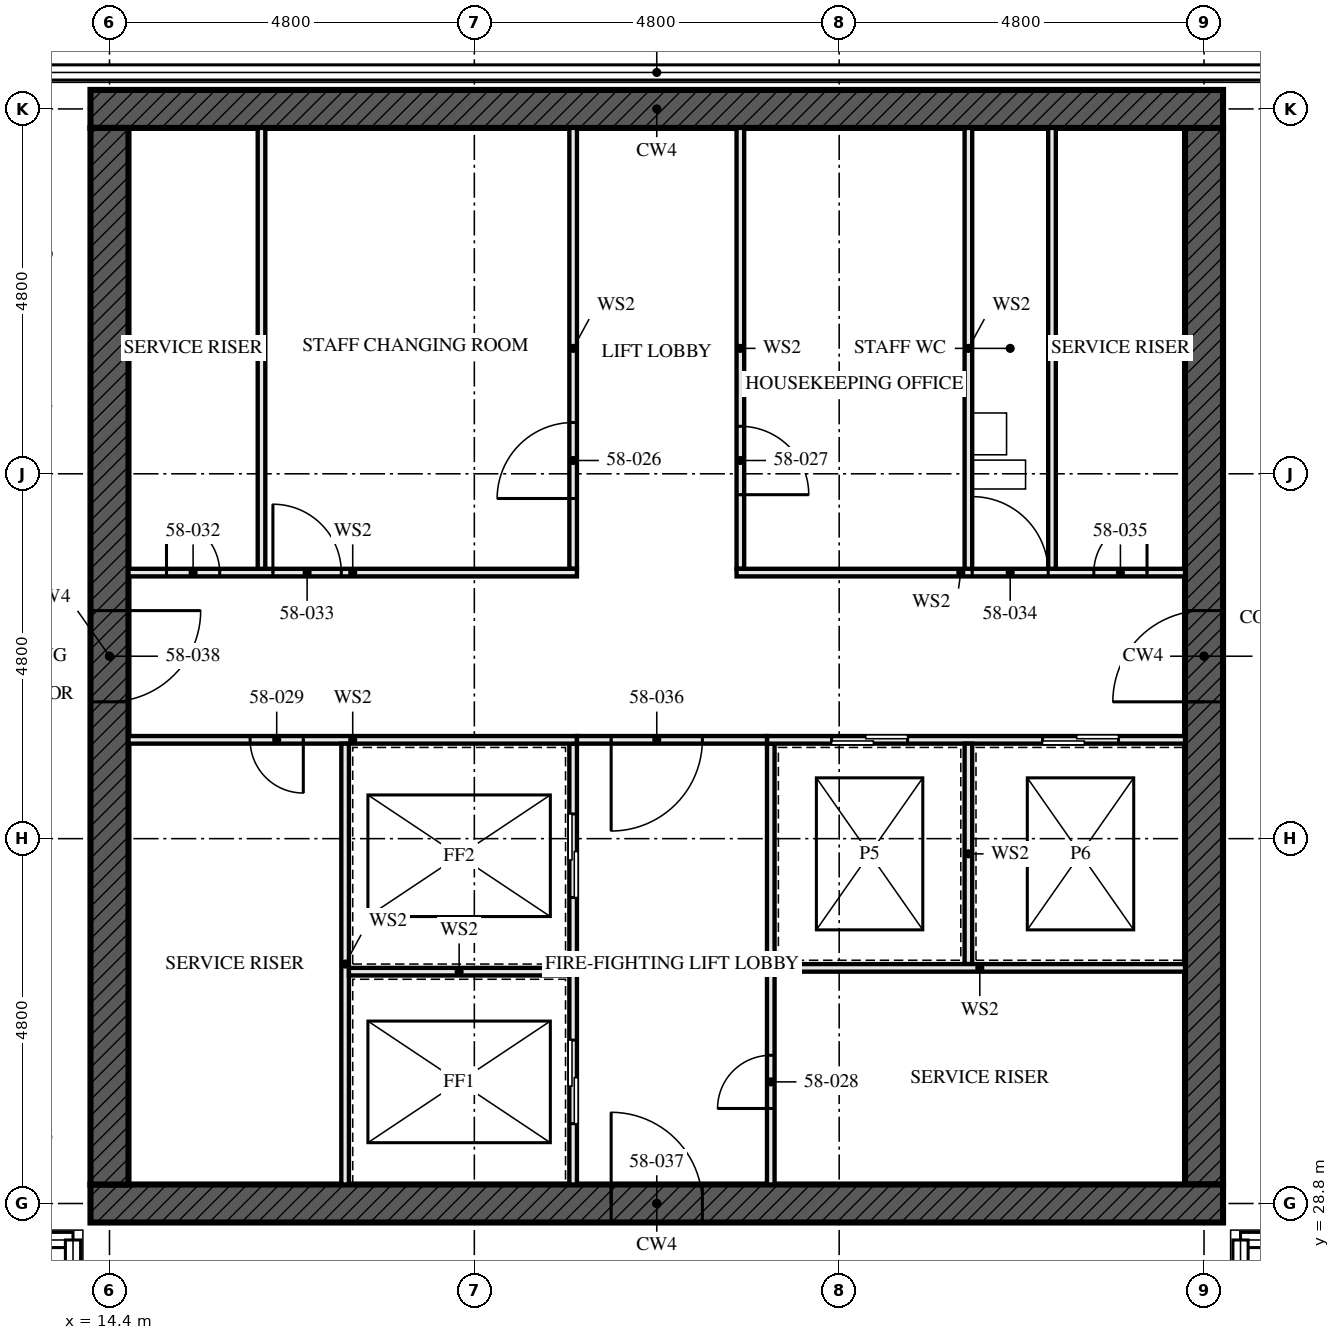
"""IFC4 building model, lengths in metres.
Left out: names, types, materials, properties, quantities, classifications, styles, units other than length and angle.
Written with IfcOpenShell. Run it as: python <this file> out.ifc"""

import sys

from ifc_helpers import new_model, si_unit, direction, frame, frame_2d, origin, place, context, subcontext, project, spatial, rectangle, extrude, element, fill, save


model = new_model("IFC4")
c1 = context("Model", 3, precision=1e-05, world=origin(), true_north=direction((0.0, 1.0)))
c2 = subcontext(c1, "Body", "Model", "MODEL_VIEW")
j1 = project(units=[si_unit("LENGTHUNIT", "METRE"), si_unit("PLANEANGLEUNIT", "RADIAN")], contexts=[c1])
p1 = place(None, origin())
s1 = spatial("IfcSite", under=j1, at=p1, CompositionType="ELEMENT")
p2 = place(p1, origin())
s2 = spatial("IfcBuilding", under=s1, at=p2, CompositionType="ELEMENT")
p3 = place(p2, frame((0.0, 0.0, 212.0)))
s3 = spatial("IfcBuildingStorey", under=s2, at=p3, CompositionType="ELEMENT", Elevation=212.0)
p4 = place(p3, frame((14.15, 28.8, -0.17), z_axis=(0.0, 0.0, 1.0), x_axis=(1.0, 0.0, 0.0)))
e1 = element("IfcWall", 1, at=p4, inside=s3, PredefinedType="SHEAR", context=c2, shape_type="SweptSolid", body=[
    extrude(rectangle(XDim=14.9, YDim=0.5, at=frame_2d((7.45, 0.0))), origin(), (0.0, 0.0, 1.0), 3.5),
])
p5 = place(p4, frame((6.85, 0.0, 0.17)))
e2 = element("IfcOpeningElement", 2, at=p5, cuts=e1, PredefinedType="OPENING", context=c2, shape_type="SweptSolid", body=[
    extrude(rectangle(XDim=1.2, YDim=2.1, at=frame_2d((0.6, 1.05))), frame((0.0, 0.26, 0.0), z_axis=(0.0, -1.0, 0.0), x_axis=(1.0, 0.0, 0.0)), (0.0, 0.0, 1.0), 0.521),
])
p6 = place(p3, frame((29.05, 43.2, -0.17), z_axis=(0.0, 0.0, 1.0), x_axis=(-1.0, 0.0, 0.0)))
e3 = element("IfcWall", 3, at=p6, inside=s3, PredefinedType="SHEAR", context=c2, shape_type="SweptSolid", body=[
    extrude(rectangle(XDim=14.9, YDim=0.5, at=frame_2d((7.45, 0.0))), origin(), (0.0, 0.0, 1.0), 3.5),
])
p7 = place(p3, frame((14.4, 42.95, -0.17), z_axis=(0.0, 0.0, 1.0), x_axis=(0.0, -1.0, 0.0)))
e4 = element("IfcWall", 4, at=p7, inside=s3, PredefinedType="SHEAR", context=c2, shape_type="SweptSolid", body=[
    extrude(rectangle(XDim=13.9, YDim=0.5, at=frame_2d((6.95, 0.0))), origin(), (0.0, 0.0, 1.0), 3.5),
])
p8 = place(p7, frame((6.35, 0.0, 0.17)))
e5 = element("IfcOpeningElement", 5, at=p8, cuts=e4, PredefinedType="OPENING", context=c2, shape_type="SweptSolid", body=[
    extrude(rectangle(XDim=1.2, YDim=2.1, at=frame_2d((0.6, 1.05))), frame((0.0, 0.26, 0.0), z_axis=(0.0, -1.0, 0.0), x_axis=(1.0, 0.0, 0.0)), (0.0, 0.0, 1.0), 0.521),
])
p9 = place(p3, frame((28.8, 29.05, -0.17), z_axis=(0.0, 0.0, 1.0), x_axis=(0.0, 1.0, 0.0)))
e6 = element("IfcWall", 6, at=p9, inside=s3, PredefinedType="SHEAR", context=c2, shape_type="SweptSolid", body=[
    extrude(rectangle(XDim=13.9, YDim=0.5, at=frame_2d((6.95, 0.0))), origin(), (0.0, 0.0, 1.0), 3.5),
])
p10 = place(p9, frame((6.35, 0.0, 0.17)))
e7 = element("IfcOpeningElement", 7, at=p10, cuts=e6, PredefinedType="OPENING", context=c2, shape_type="SweptSolid", body=[
    extrude(rectangle(XDim=1.2, YDim=2.1, at=frame_2d((0.6, 1.05))), frame((0.0, 0.26, 0.0), z_axis=(0.0, -1.0, 0.0), x_axis=(1.0, 0.0, 0.0)), (0.0, 0.0, 1.0), 0.521),
])
for number, where, z_axis, x_axis in (
    (8, (16.4, 37.15, 0.0), (0.0, 0.0, 1.0), (0.0, 1.0, 0.0)),
    (9, (26.8, 37.15, 0.0), (0.0, 0.0, 1.0), (0.0, 1.0, 0.0)),
):
    element("IfcWall", number, at=place(p3, frame(where, z_axis=z_axis, x_axis=x_axis)), inside=s3, PredefinedType="SOLIDWALL", context=c2, shape_type="SweptSolid", body=[
        extrude(rectangle(XDim=5.8, YDim=0.1, at=frame_2d((2.9, 0.0))), origin(), (0.0, 0.0, 1.0), 3.33),
    ])
p11 = place(p3, frame((20.5, 29.05, 0.0), z_axis=(0.0, 0.0, 1.0), x_axis=(0.0, 1.0, 0.0)))
e10 = element("IfcWall", 10, at=p11, inside=s3, PredefinedType="SOLIDWALL", context=c2, shape_type="SweptSolid", body=[
    extrude(rectangle(XDim=5.8, YDim=0.1, at=frame_2d((2.9, 0.0))), origin(), (0.0, 0.0, 1.0), 3.33),
])
p12 = place(p11, frame((0.8, 0.0, 0.0)))
e11 = element("IfcOpeningElement", 11, at=p12, cuts=e10, PredefinedType="OPENING", context=c2, shape_type="SweptSolid", body=[
    extrude(rectangle(XDim=1.1, YDim=2.3, at=frame_2d((0.55, 1.15))), frame((0.0, 0.061, 0.0), z_axis=(0.0, -1.0, 0.0), x_axis=(1.0, 0.0, 0.0)), (0.0, 0.0, 1.0), 0.121),
])
p13 = place(p11, frame((3.775, 0.0, 0.0)))
e12 = element("IfcOpeningElement", 12, at=p13, cuts=e10, PredefinedType="OPENING", context=c2, shape_type="SweptSolid", body=[
    extrude(rectangle(XDim=1.1, YDim=2.3, at=frame_2d((0.55, 1.15))), frame((0.0, 0.061, 0.0), z_axis=(0.0, -1.0, 0.0), x_axis=(1.0, 0.0, 0.0)), (0.0, 0.0, 1.0), 0.121),
])
p14 = place(p3, frame((20.5, 37.15, 0.0), z_axis=(0.0, 0.0, 1.0), x_axis=(0.0, 1.0, 0.0)))
e13 = element("IfcWall", 13, at=p14, inside=s3, PredefinedType="SOLIDWALL", context=c2, shape_type="SweptSolid", body=[
    extrude(rectangle(XDim=5.8, YDim=0.1, at=frame_2d((2.9, 0.0))), origin(), (0.0, 0.0, 1.0), 3.33),
])
p15 = place(p14, frame((0.925, 0.0, 0.0)))
e14 = element("IfcOpeningElement", 14, at=p15, cuts=e13, PredefinedType="OPENING", context=c2, shape_type="SweptSolid", body=[
    extrude(rectangle(XDim=1.0, YDim=2.1, at=frame_2d((0.5, 1.05))), frame((0.0, 0.061, 0.0), z_axis=(0.0, -1.0, 0.0), x_axis=(1.0, 0.0, 0.0)), (0.0, 0.0, 1.0), 0.121),
])
p16 = place(p3, frame((22.7, 37.15, 0.0), z_axis=(0.0, 0.0, 1.0), x_axis=(0.0, 1.0, 0.0)))
e15 = element("IfcWall", 15, at=p16, inside=s3, PredefinedType="SOLIDWALL", context=c2, shape_type="SweptSolid", body=[
    extrude(rectangle(XDim=5.8, YDim=0.1, at=frame_2d((2.9, 0.0))), origin(), (0.0, 0.0, 1.0), 3.33),
])
p17 = place(p16, frame((0.975, 0.0, 0.0)))
e16 = element("IfcOpeningElement", 16, at=p17, cuts=e15, PredefinedType="OPENING", context=c2, shape_type="SweptSolid", body=[
    extrude(rectangle(XDim=0.9, YDim=2.1, at=frame_2d((0.45, 1.05))), frame((0.0, 0.061, 0.0), z_axis=(0.0, -1.0, 0.0), x_axis=(1.0, 0.0, 0.0)), (0.0, 0.0, 1.0), 0.121),
])
p18 = place(p3, frame((23.1, 29.05, 0.0), z_axis=(0.0, 0.0, 1.0), x_axis=(0.0, 1.0, 0.0)))
e17 = element("IfcWall", 17, at=p18, inside=s3, PredefinedType="SOLIDWALL", context=c2, shape_type="SweptSolid", body=[
    extrude(rectangle(XDim=5.8, YDim=0.1, at=frame_2d((2.9, 0.0))), origin(), (0.0, 0.0, 1.0), 3.33),
])
p19 = place(p18, frame((1.0, 0.0, 0.0)))
e18 = element("IfcOpeningElement", 18, at=p19, cuts=e17, PredefinedType="OPENING", context=c2, shape_type="SweptSolid", body=[
    extrude(rectangle(XDim=0.7, YDim=2.1, at=frame_2d((0.35, 1.05))), frame((0.0, 0.061, 0.0), z_axis=(0.0, -1.0, 0.0), x_axis=(1.0, 0.0, 0.0)), (0.0, 0.0, 1.0), 0.121),
])
p20 = place(p3, frame((14.65, 34.9, 0.0), z_axis=(0.0, 0.0, 1.0), x_axis=(1.0, 0.0, 0.0)))
e19 = element("IfcWall", 19, at=p20, inside=s3, PredefinedType="SOLIDWALL", context=c2, shape_type="SweptSolid", body=[
    extrude(rectangle(XDim=5.9, YDim=0.1, at=frame_2d((2.95, 0.0))), origin(), (0.0, 0.0, 1.0), 3.33),
])
p21 = place(p20, frame((1.6, 0.0, 0.0)))
e20 = element("IfcOpeningElement", 20, at=p21, cuts=e19, PredefinedType="OPENING", context=c2, shape_type="SweptSolid", body=[
    extrude(rectangle(XDim=0.7, YDim=2.1, at=frame_2d((0.35, 1.05))), frame((0.0, 0.061, 0.0), z_axis=(0.0, -1.0, 0.0), x_axis=(1.0, 0.0, 0.0)), (0.0, 0.0, 1.0), 0.121),
])
p22 = place(p3, frame((23.05, 34.9, 0.0), z_axis=(0.0, 0.0, 1.0), x_axis=(1.0, 0.0, 0.0)))
e21 = element("IfcWall", 21, at=p22, inside=s3, PredefinedType="SOLIDWALL", context=c2, shape_type="SweptSolid", body=[
    extrude(rectangle(XDim=5.5, YDim=0.1, at=frame_2d((2.75, 0.0))), origin(), (0.0, 0.0, 1.0), 3.33),
])
p23 = place(p22, frame((0.85, 0.0, 0.0)))
e22 = element("IfcOpeningElement", 22, at=p23, cuts=e21, PredefinedType="OPENING", context=c2, shape_type="SweptSolid", body=[
    extrude(rectangle(XDim=1.0, YDim=2.1, at=frame_2d((0.5, 1.05))), frame((0.0, 0.061, 0.0), z_axis=(0.0, -1.0, 0.0), x_axis=(1.0, 0.0, 0.0)), (0.0, 0.0, 1.0), 0.121),
])
p24 = place(p22, frame((3.625, 0.0, 0.0)))
e23 = element("IfcOpeningElement", 23, at=p24, cuts=e21, PredefinedType="OPENING", context=c2, shape_type="SweptSolid", body=[
    extrude(rectangle(XDim=1.0, YDim=2.1, at=frame_2d((0.5, 1.05))), frame((0.0, 0.061, 0.0), z_axis=(0.0, -1.0, 0.0), x_axis=(1.0, 0.0, 0.0)), (0.0, 0.0, 1.0), 0.121),
])
p25 = place(p3, frame((14.65, 37.1, 0.0), z_axis=(0.0, 0.0, 1.0), x_axis=(1.0, 0.0, 0.0)))
e24 = element("IfcWall", 24, at=p25, inside=s3, PredefinedType="SOLIDWALL", context=c2, shape_type="SweptSolid", body=[
    extrude(rectangle(XDim=5.9, YDim=0.1, at=frame_2d((2.95, 0.0))), origin(), (0.0, 0.0, 1.0), 3.33),
])
p26 = place(p25, frame((0.5, 0.0, 0.0)))
e25 = element("IfcOpeningElement", 25, at=p26, cuts=e24, PredefinedType="OPENING", context=c2, shape_type="SweptSolid", body=[
    extrude(rectangle(XDim=0.7, YDim=2.1, at=frame_2d((0.35, 1.05))), frame((0.0, 0.061, 0.0), z_axis=(0.0, -1.0, 0.0), x_axis=(1.0, 0.0, 0.0)), (0.0, 0.0, 1.0), 0.121),
])
p27 = place(p25, frame((1.9, 0.0, 0.0)))
e26 = element("IfcOpeningElement", 26, at=p27, cuts=e24, PredefinedType="OPENING", context=c2, shape_type="SweptSolid", body=[
    extrude(rectangle(XDim=0.9, YDim=2.1, at=frame_2d((0.45, 1.05))), frame((0.0, 0.061, 0.0), z_axis=(0.0, -1.0, 0.0), x_axis=(1.0, 0.0, 0.0)), (0.0, 0.0, 1.0), 0.121),
])
p28 = place(p3, frame((22.65, 37.1, 0.0), z_axis=(0.0, 0.0, 1.0), x_axis=(1.0, 0.0, 0.0)))
e27 = element("IfcWall", 27, at=p28, inside=s3, PredefinedType="SOLIDWALL", context=c2, shape_type="SweptSolid", body=[
    extrude(rectangle(XDim=5.9, YDim=0.1, at=frame_2d((2.95, 0.0))), origin(), (0.0, 0.0, 1.0), 3.33),
])
p29 = place(p28, frame((3.1, 0.0, 0.0)))
e28 = element("IfcOpeningElement", 28, at=p29, cuts=e27, PredefinedType="OPENING", context=c2, shape_type="SweptSolid", body=[
    extrude(rectangle(XDim=1.0, YDim=2.1, at=frame_2d((0.5, 1.05))), frame((0.0, 0.061, 0.0), z_axis=(0.0, -1.0, 0.0), x_axis=(1.0, 0.0, 0.0)), (0.0, 0.0, 1.0), 0.121),
])
p30 = place(p28, frame((4.7, 0.0, 0.0)))
e29 = element("IfcOpeningElement", 29, at=p30, cuts=e27, PredefinedType="OPENING", context=c2, shape_type="SweptSolid", body=[
    extrude(rectangle(XDim=0.7, YDim=2.1, at=frame_2d((0.35, 1.05))), frame((0.0, 0.061, 0.0), z_axis=(0.0, -1.0, 0.0), x_axis=(1.0, 0.0, 0.0)), (0.0, 0.0, 1.0), 0.121),
])
p31 = place(p3, frame((20.55, 34.9, 0.0), z_axis=(0.0, 0.0, 1.0), x_axis=(1.0, 0.0, 0.0)))
e30 = element("IfcWall", 30, at=p31, inside=s3, PredefinedType="SOLIDWALL", context=c2, shape_type="SweptSolid", body=[
    extrude(rectangle(XDim=2.5, YDim=0.1, at=frame_2d((1.25, 0.0))), origin(), (0.0, 0.0, 1.0), 3.33),
])
p32 = place(p31, frame((0.45, 0.0, 0.0)))
e31 = element("IfcOpeningElement", 31, at=p32, cuts=e30, PredefinedType="OPENING", context=c2, shape_type="SweptSolid", body=[
    extrude(rectangle(XDim=1.2, YDim=2.1, at=frame_2d((0.6, 1.05))), frame((0.0, 0.061, 0.0), z_axis=(0.0, -1.0, 0.0), x_axis=(1.0, 0.0, 0.0)), (0.0, 0.0, 1.0), 0.121),
])
p33 = place(p3, frame((17.5, 29.05, 0.0), z_axis=(0.0, 0.0, 1.0), x_axis=(0.0, 1.0, 0.0)))
e32 = element("IfcWall", 32, at=p33, inside=s3, PredefinedType="SOLIDWALL", context=c2, shape_type="SweptSolid", body=[
    extrude(rectangle(XDim=5.8, YDim=0.1, at=frame_2d((2.9, 0.0))), origin(), (0.0, 0.0, 1.0), 3.33),
])
p34 = place(p3, frame((17.55, 31.85, 0.0), z_axis=(0.0, 0.0, 1.0), x_axis=(1.0, 0.0, 0.0)))
e33 = element("IfcWall", 33, at=p34, inside=s3, PredefinedType="SOLIDWALL", context=c2, shape_type="SweptSolid", body=[
    extrude(rectangle(XDim=2.9, YDim=0.1, at=frame_2d((1.45, 0.0))), origin(), (0.0, 0.0, 1.0), 3.33),
])
p35 = place(p3, frame((25.7, 37.15, 0.0), z_axis=(0.0, 0.0, 1.0), x_axis=(0.0, 1.0, 0.0)))
e34 = element("IfcWall", 34, at=p35, inside=s3, PredefinedType="SOLIDWALL", context=c2, shape_type="SweptSolid", body=[
    extrude(rectangle(XDim=5.8, YDim=0.1, at=frame_2d((2.9, 0.0))), origin(), (0.0, 0.0, 1.0), 3.33),
])
p36 = place(p3, frame((25.7, 31.95, 0.0), z_axis=(0.0, 0.0, 1.0), x_axis=(0.0, 1.0, 0.0)))
e35 = element("IfcWall", 35, at=p36, inside=s3, PredefinedType="SOLIDWALL", context=c2, shape_type="SweptSolid", body=[
    extrude(rectangle(XDim=2.9, YDim=0.1, at=frame_2d((1.45, 0.0))), origin(), (0.0, 0.0, 1.0), 3.33),
])
p37 = place(p3, frame((23.15, 31.9, 0.0), z_axis=(0.0, 0.0, 1.0), x_axis=(1.0, 0.0, 0.0)))
e36 = element("IfcWall", 36, at=p37, inside=s3, PredefinedType="SOLIDWALL", context=c2, shape_type="SweptSolid", body=[
    extrude(rectangle(XDim=5.4, YDim=0.1, at=frame_2d((2.7, 0.0))), origin(), (0.0, 0.0, 1.0), 3.33),
])
p38 = place(p12, origin())
e37 = element("IfcDoor", 37, at=p38, inside=s3, OperationType="SLIDING_TO_LEFT", PredefinedType="DOOR", context=c2, shape_type="SweptSolid", body=[
    extrude(rectangle(XDim=1.1, YDim=2.3, at=frame_2d((0.55, 1.15))), frame((0.0, 0.05, 0.0), z_axis=(0.0, -1.0, 0.0), x_axis=(1.0, 0.0, 0.0)), (0.0, 0.0, 1.0), 0.1),
])
fill(e11, e37)
p39 = place(p13, origin())
e38 = element("IfcDoor", 38, at=p39, inside=s3, OperationType="SLIDING_TO_LEFT", PredefinedType="DOOR", context=c2, shape_type="SweptSolid", body=[
    extrude(rectangle(XDim=1.1, YDim=2.3, at=frame_2d((0.55, 1.15))), frame((0.0, 0.05, 0.0), z_axis=(0.0, -1.0, 0.0), x_axis=(1.0, 0.0, 0.0)), (0.0, 0.0, 1.0), 0.1),
])
fill(e12, e38)
p40 = place(p15, origin())
e39 = element("IfcDoor", 39, at=p40, inside=s3, OperationType="SINGLE_SWING_RIGHT", PredefinedType="DOOR", context=c2, shape_type="SweptSolid", body=[
    extrude(rectangle(XDim=1.0, YDim=2.1, at=frame_2d((0.5, 1.05))), frame((0.0, 0.027, 0.0), z_axis=(0.0, -1.0, 0.0), x_axis=(1.0, 0.0, 0.0)), (0.0, 0.0, 1.0), 0.054),
])
fill(e14, e39)
p41 = place(p17, frame((0.9, 0.0, 0.0), z_axis=(0.0, 0.0, 1.0), x_axis=(-1.0, 0.0, 0.0)))
e40 = element("IfcDoor", 40, at=p41, inside=s3, OperationType="SINGLE_SWING_LEFT", PredefinedType="DOOR", context=c2, shape_type="SweptSolid", body=[
    extrude(rectangle(XDim=0.9, YDim=2.1, at=frame_2d((0.45, 1.05))), frame((0.0, 0.027, 0.0), z_axis=(0.0, -1.0, 0.0), x_axis=(1.0, 0.0, 0.0)), (0.0, 0.0, 1.0), 0.054),
])
fill(e16, e40)
p42 = place(p19, origin())
e41 = element("IfcDoor", 41, at=p42, inside=s3, OperationType="SINGLE_SWING_RIGHT", PredefinedType="DOOR", context=c2, shape_type="SweptSolid", body=[
    extrude(rectangle(XDim=0.7, YDim=2.1, at=frame_2d((0.35, 1.05))), frame((0.0, 0.027, 0.0), z_axis=(0.0, -1.0, 0.0), x_axis=(1.0, 0.0, 0.0)), (0.0, 0.0, 1.0), 0.054),
])
fill(e18, e41)
p43 = place(p21, frame((0.7, 0.0, 0.0), z_axis=(0.0, 0.0, 1.0), x_axis=(-1.0, 0.0, 0.0)))
e42 = element("IfcDoor", 42, at=p43, inside=s3, OperationType="SINGLE_SWING_RIGHT", PredefinedType="DOOR", context=c2, shape_type="SweptSolid", body=[
    extrude(rectangle(XDim=0.7, YDim=2.1, at=frame_2d((0.35, 1.05))), frame((0.0, 0.027, 0.0), z_axis=(0.0, -1.0, 0.0), x_axis=(1.0, 0.0, 0.0)), (0.0, 0.0, 1.0), 0.054),
])
fill(e20, e42)
p44 = place(p23, origin())
e43 = element("IfcDoor", 43, at=p44, inside=s3, OperationType="SLIDING_TO_LEFT", PredefinedType="DOOR", context=c2, shape_type="SweptSolid", body=[
    extrude(rectangle(XDim=1.0, YDim=2.1, at=frame_2d((0.5, 1.05))), frame((0.0, 0.05, 0.0), z_axis=(0.0, -1.0, 0.0), x_axis=(1.0, 0.0, 0.0)), (0.0, 0.0, 1.0), 0.1),
])
fill(e22, e43)
p45 = place(p24, origin())
e44 = element("IfcDoor", 44, at=p45, inside=s3, OperationType="SLIDING_TO_LEFT", PredefinedType="DOOR", context=c2, shape_type="SweptSolid", body=[
    extrude(rectangle(XDim=1.0, YDim=2.1, at=frame_2d((0.5, 1.05))), frame((0.0, 0.05, 0.0), z_axis=(0.0, -1.0, 0.0), x_axis=(1.0, 0.0, 0.0)), (0.0, 0.0, 1.0), 0.1),
])
fill(e23, e44)
p46 = place(p26, origin())
e45 = element("IfcDoor", 45, at=p46, inside=s3, OperationType="SINGLE_SWING_RIGHT", PredefinedType="DOOR", context=c2, shape_type="SweptSolid", body=[
    extrude(rectangle(XDim=0.7, YDim=2.1, at=frame_2d((0.35, 1.05))), frame((0.0, 0.027, 0.0), z_axis=(0.0, -1.0, 0.0), x_axis=(1.0, 0.0, 0.0)), (0.0, 0.0, 1.0), 0.054),
])
fill(e25, e45)
p47 = place(p27, origin())
e46 = element("IfcDoor", 46, at=p47, inside=s3, OperationType="SINGLE_SWING_RIGHT", PredefinedType="DOOR", context=c2, shape_type="SweptSolid", body=[
    extrude(rectangle(XDim=0.9, YDim=2.1, at=frame_2d((0.45, 1.05))), frame((0.0, 0.027, 0.0), z_axis=(0.0, -1.0, 0.0), x_axis=(1.0, 0.0, 0.0)), (0.0, 0.0, 1.0), 0.054),
])
fill(e26, e46)
p48 = place(p29, origin())
e47 = element("IfcDoor", 47, at=p48, inside=s3, OperationType="SINGLE_SWING_RIGHT", PredefinedType="DOOR", context=c2, shape_type="SweptSolid", body=[
    extrude(rectangle(XDim=1.0, YDim=2.1, at=frame_2d((0.5, 1.05))), frame((0.0, 0.027, 0.0), z_axis=(0.0, -1.0, 0.0), x_axis=(1.0, 0.0, 0.0)), (0.0, 0.0, 1.0), 0.054),
])
fill(e28, e47)
p49 = place(p30, origin())
e48 = element("IfcDoor", 48, at=p49, inside=s3, OperationType="SINGLE_SWING_LEFT", PredefinedType="DOOR", context=c2, shape_type="SweptSolid", body=[
    extrude(rectangle(XDim=0.7, YDim=2.1, at=frame_2d((0.35, 1.05))), frame((0.0, 0.027, 0.0), z_axis=(0.0, -1.0, 0.0), x_axis=(1.0, 0.0, 0.0)), (0.0, 0.0, 1.0), 0.054),
])
fill(e29, e48)
p50 = place(p32, frame((1.2, 0.0, 0.0), z_axis=(0.0, 0.0, 1.0), x_axis=(-1.0, 0.0, 0.0)))
e49 = element("IfcDoor", 49, at=p50, inside=s3, OperationType="SINGLE_SWING_LEFT", PredefinedType="DOOR", context=c2, shape_type="SweptSolid", body=[
    extrude(rectangle(XDim=1.2, YDim=2.1, at=frame_2d((0.6, 1.05))), frame((0.0, 0.027, 0.0), z_axis=(0.0, -1.0, 0.0), x_axis=(1.0, 0.0, 0.0)), (0.0, 0.0, 1.0), 0.054),
])
fill(e31, e49)
p51 = place(p5, origin())
e50 = element("IfcDoor", 50, at=p51, inside=s3, OperationType="SINGLE_SWING_LEFT", PredefinedType="DOOR", context=c2, shape_type="SweptSolid", body=[
    extrude(rectangle(XDim=1.2, YDim=2.1, at=frame_2d((0.6, 1.05))), frame((0.0, 0.027, 0.0), z_axis=(0.0, -1.0, 0.0), x_axis=(1.0, 0.0, 0.0)), (0.0, 0.0, 1.0), 0.054),
])
fill(e2, e50)
p52 = place(p8, origin())
e51 = element("IfcDoor", 51, at=p52, inside=s3, OperationType="SINGLE_SWING_LEFT", PredefinedType="DOOR", context=c2, shape_type="SweptSolid", body=[
    extrude(rectangle(XDim=1.2, YDim=2.1, at=frame_2d((0.6, 1.05))), frame((0.0, 0.027, 0.0), z_axis=(0.0, -1.0, 0.0), x_axis=(1.0, 0.0, 0.0)), (0.0, 0.0, 1.0), 0.054),
])
fill(e5, e51)
p53 = place(p10, origin())
e52 = element("IfcDoor", 52, at=p53, inside=s3, OperationType="SINGLE_SWING_LEFT", PredefinedType="DOOR", context=c2, shape_type="SweptSolid", body=[
    extrude(rectangle(XDim=1.2, YDim=2.1, at=frame_2d((0.6, 1.05))), frame((0.0, 0.027, 0.0), z_axis=(0.0, -1.0, 0.0), x_axis=(1.0, 0.0, 0.0)), (0.0, 0.0, 1.0), 0.054),
])
fill(e7, e52)
save(model, sys.argv[1])
